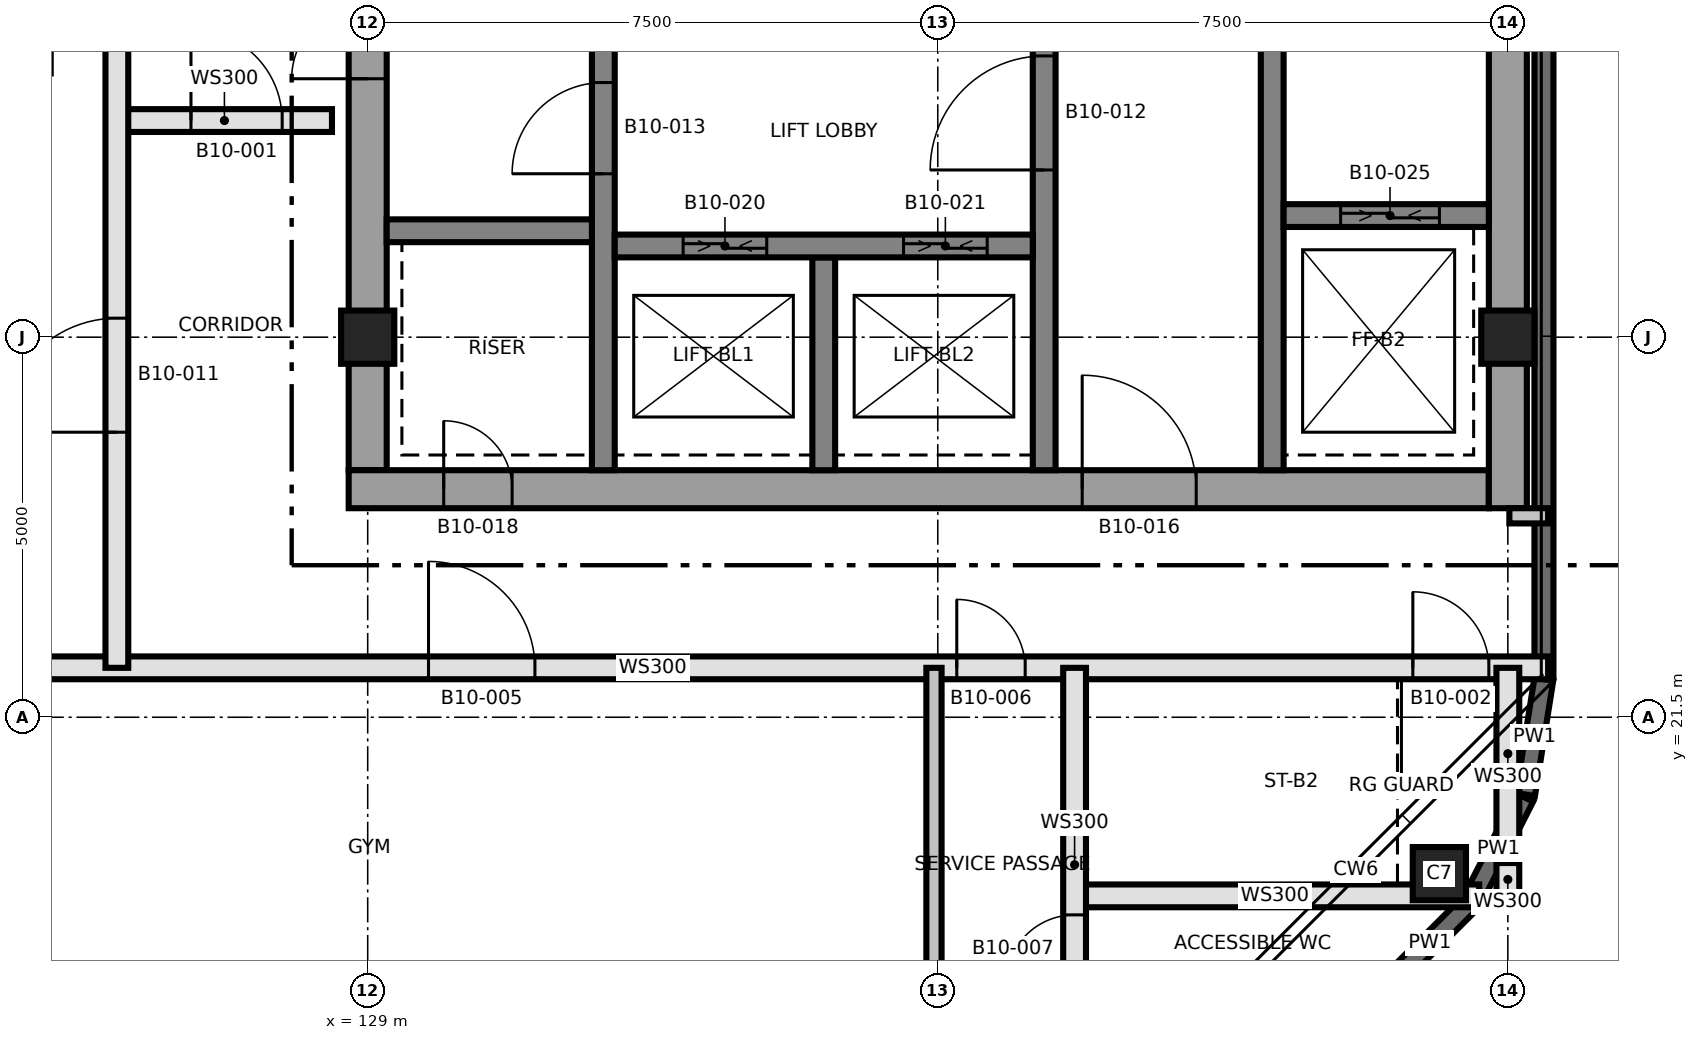
"""IFC4 building model, lengths in metres.
Left out: names, types, materials, properties, quantities, classifications, styles, units other than length and angle.
Written with IfcOpenShell. Run it as: python <this file> out.ifc"""

import sys

from ifc_helpers import new_model, si_unit, direction, frame, frame_2d, origin, origin_2d, place, context, subcontext, project, spatial, rectangle, extrude, element, fill, save


model = new_model("IFC4")
c1 = context("Model", 3, precision=1e-05, world=origin(), true_north=direction((0.0, 1.0)))
c2 = subcontext(c1, "Body", "Model", "MODEL_VIEW")
j1 = project(units=[si_unit("LENGTHUNIT", "METRE"), si_unit("PLANEANGLEUNIT", "RADIAN")], contexts=[c1])
p1 = place(None, origin())
s1 = spatial("IfcSite", under=j1, at=p1, CompositionType="ELEMENT")
p2 = place(p1, origin())
s2 = spatial("IfcBuilding", under=s1, at=p2, CompositionType="ELEMENT")
p3 = place(p2, frame((0.0, 0.0, 101.9)))
s3 = spatial("IfcBuildingStorey", under=s2, at=p3, CompositionType="ELEMENT", Elevation=101.9)
p4 = place(p3, frame((129.0, 24.75, 0.0), z_axis=(0.0, 0.0, 1.0), x_axis=(0.0, 1.0, 0.0)))
e1 = element("IfcWall", 1, at=p4, inside=s3, PredefinedType="SHEAR", context=c2, shape_type="SweptSolid", body=[
    extrude(rectangle(XDim=12.5, YDim=0.5, at=frame_2d((6.25, 0.0))), origin(), (0.0, 0.0, 1.0), 3.7),
])
p5 = place(p4, frame((5.15, 0.0, 0.0)))
e2 = element("IfcOpeningElement", 2, at=p5, cuts=e1, PredefinedType="OPENING", context=c2, shape_type="SweptSolid", body=[
    extrude(rectangle(XDim=1.0, YDim=2.1, at=frame_2d((0.5, 1.05))), frame((0.0, 0.26, 0.0), z_axis=(0.0, -1.0, 0.0), x_axis=(1.0, 0.0, 0.0)), (0.0, 0.0, 1.0), 0.52),
])
p6 = place(p3, frame((128.75, 24.5, 0.0), z_axis=(0.0, 0.0, 1.0), x_axis=(1.0, 0.0, 0.0)))
e3 = element("IfcWall", 3, at=p6, inside=s3, PredefinedType="SHEAR", context=c2, shape_type="SweptSolid", body=[
    extrude(rectangle(XDim=15.0, YDim=0.5, at=frame_2d((7.5, 0.0))), origin(), (0.0, 0.0, 1.0), 3.7),
])
p7 = place(p6, frame((9.65, 0.0, 0.0)))
e4 = element("IfcOpeningElement", 4, at=p7, cuts=e3, PredefinedType="OPENING", context=c2, shape_type="SweptSolid", body=[
    extrude(rectangle(XDim=1.5, YDim=2.1, at=frame_2d((0.75, 1.05))), frame((0.0, 0.26, 0.0), z_axis=(0.0, -1.0, 0.0), x_axis=(1.0, 0.0, 0.0)), (0.0, 0.0, 1.0), 0.52),
])
p8 = place(p6, frame((1.25, 0.0, 0.0)))
e5 = element("IfcOpeningElement", 5, at=p8, cuts=e3, PredefinedType="OPENING", context=c2, shape_type="SweptSolid", body=[
    extrude(rectangle(XDim=0.9, YDim=2.1, at=frame_2d((0.45, 1.05))), frame((0.0, 0.26, 0.0), z_axis=(0.0, -1.0, 0.0), x_axis=(1.0, 0.0, 0.0)), (0.0, 0.0, 1.0), 0.52),
])
p9 = place(p3, frame((144.0, 24.25, 0.0), z_axis=(0.0, 0.0, 1.0), x_axis=(0.0, 1.0, 0.0)))
e6 = element("IfcWall", 6, at=p9, inside=s3, PredefinedType="SHEAR", context=c2, shape_type="SweptSolid", body=[
    extrude(rectangle(XDim=13.5, YDim=0.5, at=frame_2d((6.75, 0.0))), origin(), (0.0, 0.0, 1.0), 3.7),
])
p10 = place(p3, frame((132.1, 24.75, 0.0), z_axis=(0.0, 0.0, 1.0), x_axis=(0.0, 1.0, 0.0)))
e7 = element("IfcWall", 7, at=p10, inside=s3, PredefinedType="SHEAR", context=c2, shape_type="SweptSolid", body=[
    extrude(rectangle(XDim=12.5, YDim=0.3, at=frame_2d((6.25, 0.0))), origin(), (0.0, 0.0, 1.0), 3.7),
])
p11 = place(p10, frame((3.9, 0.0, 0.0)))
e8 = element("IfcOpeningElement", 8, at=p11, cuts=e7, PredefinedType="OPENING", context=c2, shape_type="SweptSolid", body=[
    extrude(rectangle(XDim=1.2, YDim=2.1, at=frame_2d((0.6, 1.05))), frame((0.0, 0.16, 0.0), z_axis=(0.0, -1.0, 0.0), x_axis=(1.0, 0.0, 0.0)), (0.0, 0.0, 1.0), 0.32),
])
p12 = place(p3, frame((137.9, 24.75, 0.0), z_axis=(0.0, 0.0, 1.0), x_axis=(0.0, 1.0, 0.0)))
e9 = element("IfcWall", 9, at=p12, inside=s3, PredefinedType="SHEAR", context=c2, shape_type="SweptSolid", body=[
    extrude(rectangle(XDim=12.5, YDim=0.3, at=frame_2d((6.25, 0.0))), origin(), (0.0, 0.0, 1.0), 3.7),
])
p13 = place(p12, frame((3.95, 0.0, 0.0)))
e10 = element("IfcOpeningElement", 10, at=p13, cuts=e9, PredefinedType="OPENING", context=c2, shape_type="SweptSolid", body=[
    extrude(rectangle(XDim=1.5, YDim=2.1, at=frame_2d((0.75, 1.05))), frame((0.0, 0.16, 0.0), z_axis=(0.0, -1.0, 0.0), x_axis=(1.0, 0.0, 0.0)), (0.0, 0.0, 1.0), 0.32),
])
p14 = place(p12, frame((10.45, 0.0, 0.0)))
e11 = element("IfcOpeningElement", 11, at=p14, cuts=e9, PredefinedType="OPENING", context=c2, shape_type="SweptSolid", body=[
    extrude(rectangle(XDim=0.9, YDim=2.1, at=frame_2d((0.45, 1.05))), frame((0.0, 0.16, 0.0), z_axis=(0.0, -1.0, 0.0), x_axis=(1.0, 0.0, 0.0)), (0.0, 0.0, 1.0), 0.32),
])
p15 = place(p3, frame((140.9, 24.75, 0.0), z_axis=(0.0, 0.0, 1.0), x_axis=(0.0, 1.0, 0.0)))
e12 = element("IfcWall", 12, at=p15, inside=s3, PredefinedType="SHEAR", context=c2, shape_type="SweptSolid", body=[
    extrude(rectangle(XDim=12.5, YDim=0.3, at=frame_2d((6.25, 0.0))), origin(), (0.0, 0.0, 1.0), 3.7),
])
p16 = place(p15, frame((5.9, 0.0, 0.0)))
e13 = element("IfcOpeningElement", 13, at=p16, cuts=e12, PredefinedType="OPENING", context=c2, shape_type="SweptSolid", body=[
    extrude(rectangle(XDim=1.2, YDim=2.1, at=frame_2d((0.6, 1.05))), frame((0.0, 0.16, 0.0), z_axis=(0.0, -1.0, 0.0), x_axis=(1.0, 0.0, 0.0)), (0.0, 0.0, 1.0), 0.32),
])
p17 = place(p3, frame((135.0, 24.75, 0.0), z_axis=(0.0, 0.0, 1.0), x_axis=(0.0, 1.0, 0.0)))
e14 = element("IfcWall", 14, at=p17, inside=s3, PredefinedType="SHEAR", context=c2, shape_type="SweptSolid", body=[
    extrude(rectangle(XDim=2.8, YDim=0.3, at=frame_2d((1.4, 0.0))), origin(), (0.0, 0.0, 1.0), 3.7),
])
p18 = place(p3, frame((132.25, 27.7, 0.0), z_axis=(0.0, 0.0, 1.0), x_axis=(1.0, 0.0, 0.0)))
e15 = element("IfcWall", 15, at=p18, inside=s3, PredefinedType="SHEAR", context=c2, shape_type="SweptSolid", body=[
    extrude(rectangle(XDim=5.5, YDim=0.3, at=frame_2d((2.75, 0.0))), origin(), (0.0, 0.0, 1.0), 3.7),
])
p19 = place(p18, frame((0.9, 0.0, 0.0)))
e16 = element("IfcOpeningElement", 16, at=p19, cuts=e15, PredefinedType="OPENING", context=c2, shape_type="SweptSolid", body=[
    extrude(rectangle(XDim=1.1, YDim=2.4, at=frame_2d((0.55, 1.2))), frame((0.0, 0.16, 0.0), z_axis=(0.0, -1.0, 0.0), x_axis=(1.0, 0.0, 0.0)), (0.0, 0.0, 1.0), 0.32),
])
p20 = place(p18, frame((3.8, 0.0, 0.0)))
e17 = element("IfcOpeningElement", 17, at=p20, cuts=e15, PredefinedType="OPENING", context=c2, shape_type="SweptSolid", body=[
    extrude(rectangle(XDim=1.1, YDim=2.4, at=frame_2d((0.55, 1.2))), frame((0.0, 0.16, 0.0), z_axis=(0.0, -1.0, 0.0), x_axis=(1.0, 0.0, 0.0)), (0.0, 0.0, 1.0), 0.32),
])
p21 = place(p3, frame((129.25, 27.9, 0.0), z_axis=(0.0, 0.0, 1.0), x_axis=(1.0, 0.0, 0.0)))
e18 = element("IfcWall", 18, at=p21, inside=s3, PredefinedType="SHEAR", context=c2, shape_type="SweptSolid", body=[
    extrude(rectangle(XDim=2.7, YDim=0.3, at=frame_2d((1.35, 0.0))), origin(), (0.0, 0.0, 1.0), 3.7),
])
p22 = place(p3, frame((141.05, 28.1, 0.0), z_axis=(0.0, 0.0, 1.0), x_axis=(1.0, 0.0, 0.0)))
e19 = element("IfcWall", 19, at=p22, inside=s3, PredefinedType="SHEAR", context=c2, shape_type="SweptSolid", body=[
    extrude(rectangle(XDim=2.7, YDim=0.3, at=frame_2d((1.35, 0.0))), origin(), (0.0, 0.0, 1.0), 3.7),
])
p23 = place(p22, frame((0.75, 0.0, 0.0)))
e20 = element("IfcOpeningElement", 20, at=p23, cuts=e19, PredefinedType="OPENING", context=c2, shape_type="SweptSolid", body=[
    extrude(rectangle(XDim=1.3, YDim=2.4, at=frame_2d((0.65, 1.2))), frame((0.0, 0.16, 0.0), z_axis=(0.0, -1.0, 0.0), x_axis=(1.0, 0.0, 0.0)), (0.0, 0.0, 1.0), 0.32),
])
for number, where, z_axis, x_axis in (
    (21, (143.099, 19.442, 0.0), (0.0, 0.0, 1.0), (1.0, 0.0, 0.0)),
    (22, (129.0, 26.5, 0.0), (0.0, 0.0, 1.0), (1.0, 0.0, 0.0)),
    (23, (144.0, 26.5, 0.0), (0.0, 0.0, 1.0), (1.0, 0.0, 0.0)),
):
    element("IfcColumn", number, at=place(p3, frame(where, z_axis=z_axis, x_axis=x_axis)), inside=s3, PredefinedType="COLUMN", context=c2, shape_type="SweptSolid", body=[
        extrude(rectangle(XDim=0.7, YDim=0.7, at=origin_2d()), origin(), (0.0, 0.0, 1.0), 3.7),
    ])
p24 = place(p3, frame((142.437, 17.99, 3.7), z_axis=(0.0, 0.0, 1.0), x_axis=(0.707106781187, 0.707106781187, 0.0)))
e24 = element("IfcWall", 24, at=p24, inside=s3, PredefinedType="PARAPET", context=c2, shape_type="SweptSolid", body=[
    extrude(rectangle(XDim=1.516, YDim=0.25, at=frame_2d((0.758, 0.0))), origin(), (0.0, 0.0, 1.0), 1.1),
])
p25 = place(p3, frame((143.532, 19.094, 3.7), z_axis=(0.0, 0.0, 1.0), x_axis=(0.453961953638, 0.891021068577, 0.0)))
e25 = element("IfcWall", 25, at=p25, inside=s3, PredefinedType="PARAPET", context=c2, shape_type="SweptSolid", body=[
    extrude(rectangle(XDim=1.517, YDim=0.25, at=frame_2d((0.758, 0.0))), origin(), (0.0, 0.0, 1.0), 1.1),
])
p26 = place(p3, frame((144.233, 20.483, 3.7), z_axis=(0.0, 0.0, 1.0), x_axis=(0.156378762167, 0.987697161453, 0.0)))
e26 = element("IfcWall", 26, at=p26, inside=s3, PredefinedType="PARAPET", context=c2, shape_type="SweptSolid", body=[
    extrude(rectangle(XDim=1.536, YDim=0.25, at=frame_2d((0.768, 0.0))), origin(), (0.0, 0.0, 1.0), 1.1),
])
p27 = place(p3, frame((144.475, 22.02, 3.7), z_axis=(0.0, 0.0, 1.0), x_axis=(0.0, 1.0, 0.0)))
e27 = element("IfcWall", 27, at=p27, inside=s3, PredefinedType="PARAPET", context=c2, shape_type="SweptSolid", body=[
    extrude(rectangle(XDim=17.96, YDim=0.25, at=frame_2d((8.98, 0.0))), origin(), (0.0, 0.0, 1.0), 1.1),
])
p28 = place(p3, frame((138.25, 19.15, 0.0), z_axis=(0.0, 0.0, 1.0), x_axis=(1.0, 0.0, 0.0)))
e28 = element("IfcWall", 28, at=p28, inside=s3, PredefinedType="SOLIDWALL", context=c2, shape_type="SweptSolid", body=[
    extrude(rectangle(XDim=5.373, YDim=0.3, at=frame_2d((2.687, 0.0))), origin(), (0.0, 0.0, 1.0), 3.3),
])
p29 = place(p3, frame((120.97, 22.15, 0.0), z_axis=(0.0, 0.0, 1.0), x_axis=(1.0, 0.0, 0.0)))
e29 = element("IfcWall", 29, at=p29, inside=s3, PredefinedType="SOLIDWALL", context=c2, shape_type="SweptSolid", body=[
    extrude(rectangle(XDim=23.56, YDim=0.3, at=frame_2d((11.78, 0.0))), origin(), (0.0, 0.0, 1.0), 3.3),
])
p30 = place(p29, frame((21.78, 0.0, 0.0)))
e30 = element("IfcOpeningElement", 30, at=p30, cuts=e29, PredefinedType="OPENING", context=c2, shape_type="SweptSolid", body=[
    extrude(rectangle(XDim=1.0, YDim=2.1, at=frame_2d((0.5, 1.05))), frame((0.0, 0.16, 0.0), z_axis=(0.0, -1.0, 0.0), x_axis=(1.0, 0.0, 0.0)), (0.0, 0.0, 1.0), 0.32),
])
p31 = place(p29, frame((8.83, 0.0, 0.0)))
e31 = element("IfcOpeningElement", 31, at=p31, cuts=e29, PredefinedType="OPENING", context=c2, shape_type="SweptSolid", body=[
    extrude(rectangle(XDim=1.4, YDim=2.1, at=frame_2d((0.7, 1.05))), frame((0.0, 0.16, 0.0), z_axis=(0.0, -1.0, 0.0), x_axis=(1.0, 0.0, 0.0)), (0.0, 0.0, 1.0), 0.32),
])
p32 = place(p29, frame((15.78, 0.0, 0.0)))
e32 = element("IfcOpeningElement", 32, at=p32, cuts=e29, PredefinedType="OPENING", context=c2, shape_type="SweptSolid", body=[
    extrude(rectangle(XDim=0.9, YDim=2.1, at=frame_2d((0.45, 1.05))), frame((0.0, 0.16, 0.0), z_axis=(0.0, -1.0, 0.0), x_axis=(1.0, 0.0, 0.0)), (0.0, 0.0, 1.0), 0.32),
])
p33 = place(p3, frame((144.02, 24.15, 0.0), z_axis=(0.0, 0.0, 1.0), x_axis=(1.0, 0.0, 0.0)))
e33 = element("IfcWall", 33, at=p33, inside=s3, PredefinedType="PARTITIONING", context=c2, shape_type="SweptSolid", body=[
    extrude(rectangle(XDim=0.51, YDim=0.2, at=frame_2d((0.255, 0.0))), origin(), (0.0, 0.0, 1.0), 3.3),
])
p34 = place(p3, frame((125.7, 29.35, 0.0), z_axis=(0.0, 0.0, 1.0), x_axis=(1.0, 0.0, 0.0)))
e34 = element("IfcWall", 34, at=p34, inside=s3, PredefinedType="SOLIDWALL", context=c2, shape_type="SweptSolid", body=[
    extrude(rectangle(XDim=2.83, YDim=0.3, at=frame_2d((1.415, 0.0))), origin(), (0.0, 0.0, 1.0), 3.3),
])
p35 = place(p34, frame((0.975, 0.0, 0.0)))
e35 = element("IfcOpeningElement", 35, at=p35, cuts=e34, PredefinedType="OPENING", context=c2, shape_type="SweptSolid", body=[
    extrude(rectangle(XDim=1.2, YDim=2.1, at=frame_2d((0.6, 1.05))), frame((0.0, 0.16, 0.0), z_axis=(0.0, -1.0, 0.0), x_axis=(1.0, 0.0, 0.0)), (0.0, 0.0, 1.0), 0.32),
])
p36 = place(p3, frame((125.7, 22.15, 0.0), z_axis=(0.0, 0.0, 1.0), x_axis=(0.0, 1.0, 0.0)))
e36 = element("IfcWall", 36, at=p36, inside=s3, PredefinedType="SOLIDWALL", context=c2, shape_type="SweptSolid", body=[
    extrude(rectangle(XDim=17.7, YDim=0.3, at=frame_2d((8.85, 0.0))), origin(), (0.0, 0.0, 1.0), 3.3),
])
p37 = place(p36, frame((3.1, 0.0, 0.0)))
e37 = element("IfcOpeningElement", 37, at=p37, cuts=e36, PredefinedType="OPENING", context=c2, shape_type="SweptSolid", body=[
    extrude(rectangle(XDim=1.5, YDim=2.1, at=frame_2d((0.75, 1.05))), frame((0.0, 0.16, 0.0), z_axis=(0.0, -1.0, 0.0), x_axis=(1.0, 0.0, 0.0)), (0.0, 0.0, 1.0), 0.32),
])
p38 = place(p3, frame((136.45, 16.97, 0.0), z_axis=(0.0, 0.0, 1.0), x_axis=(0.0, 1.0, 0.0)))
e38 = element("IfcWall", 38, at=p38, inside=s3, PredefinedType="PARTITIONING", context=c2, shape_type="SweptSolid", body=[
    extrude(rectangle(XDim=5.18, YDim=0.2, at=frame_2d((2.59, 0.0))), origin(), (0.0, 0.0, 1.0), 3.3),
])
p39 = place(p3, frame((138.3, 16.97, 0.0), z_axis=(0.0, 0.0, 1.0), x_axis=(0.0, 1.0, 0.0)))
e39 = element("IfcWall", 39, at=p39, inside=s3, PredefinedType="SOLIDWALL", context=c2, shape_type="SweptSolid", body=[
    extrude(rectangle(XDim=5.18, YDim=0.3, at=frame_2d((2.59, 0.0))), origin(), (0.0, 0.0, 1.0), 3.3),
])
p40 = place(p39, frame((1.03, 0.0, 0.0)))
e40 = element("IfcOpeningElement", 40, at=p40, cuts=e39, PredefinedType="OPENING", context=c2, shape_type="SweptSolid", body=[
    extrude(rectangle(XDim=0.9, YDim=2.1, at=frame_2d((0.45, 1.05))), frame((0.0, 0.16, 0.0), z_axis=(0.0, -1.0, 0.0), x_axis=(1.0, 0.0, 0.0)), (0.0, 0.0, 1.0), 0.32),
])
p41 = place(p3, frame((144.0, 19.15, 0.0), z_axis=(0.0, 0.0, 1.0), x_axis=(0.0, 1.0, 0.0)))
e41 = element("IfcWall", 41, at=p41, inside=s3, PredefinedType="SOLIDWALL", context=c2, shape_type="SweptSolid", body=[
    extrude(rectangle(XDim=0.432, YDim=0.3, at=frame_2d((0.216, 0.0))), origin(), (0.0, 0.0, 1.0), 3.3),
])
p42 = place(p3, frame((144.0, 19.891, 0.0), z_axis=(0.0, 0.0, 1.0), x_axis=(0.0, 1.0, 0.0)))
e42 = element("IfcWall", 42, at=p42, inside=s3, PredefinedType="SOLIDWALL", context=c2, shape_type="SweptSolid", body=[
    extrude(rectangle(XDim=2.259, YDim=0.3, at=frame_2d((1.129, 0.0))), origin(), (0.0, 0.0, 1.0), 3.3),
])
p43 = place(p35, origin())
e43 = element("IfcDoor", 43, at=p43, inside=s3, OperationType="SINGLE_SWING_LEFT", PredefinedType="DOOR", context=c2, shape_type="SweptSolid", body=[
    extrude(rectangle(XDim=1.2, YDim=2.1, at=frame_2d((0.6, 1.05))), frame((0.0, 0.025, 0.0), z_axis=(0.0, -1.0, 0.0), x_axis=(1.0, 0.0, 0.0)), (0.0, 0.0, 1.0), 0.05),
])
fill(e35, e43)
p44 = place(p30, origin())
e44 = element("IfcDoor", 44, at=p44, inside=s3, OperationType="SINGLE_SWING_RIGHT", PredefinedType="DOOR", context=c2, shape_type="SweptSolid", body=[
    extrude(rectangle(XDim=1.0, YDim=2.1, at=frame_2d((0.5, 1.05))), frame((0.0, 0.025, 0.0), z_axis=(0.0, -1.0, 0.0), x_axis=(1.0, 0.0, 0.0)), (0.0, 0.0, 1.0), 0.05),
])
fill(e30, e44)
p45 = place(p31, origin())
e45 = element("IfcDoor", 45, at=p45, inside=s3, OperationType="SINGLE_SWING_LEFT", PredefinedType="DOOR", context=c2, shape_type="SweptSolid", body=[
    extrude(rectangle(XDim=1.4, YDim=2.1, at=frame_2d((0.7, 1.05))), frame((0.0, 0.025, 0.0), z_axis=(0.0, -1.0, 0.0), x_axis=(1.0, 0.0, 0.0)), (0.0, 0.0, 1.0), 0.05),
])
fill(e31, e45)
p46 = place(p32, origin())
e46 = element("IfcDoor", 46, at=p46, inside=s3, OperationType="SINGLE_SWING_RIGHT", PredefinedType="DOOR", context=c2, shape_type="SweptSolid", body=[
    extrude(rectangle(XDim=0.9, YDim=2.1, at=frame_2d((0.45, 1.05))), frame((0.0, 0.025, 0.0), z_axis=(0.0, -1.0, 0.0), x_axis=(1.0, 0.0, 0.0)), (0.0, 0.0, 1.0), 0.05),
])
fill(e32, e46)
p47 = place(p40, origin())
e47 = element("IfcDoor", 47, at=p47, inside=s3, OperationType="SINGLE_SWING_RIGHT", PredefinedType="DOOR", context=c2, shape_type="SweptSolid", body=[
    extrude(rectangle(XDim=0.9, YDim=2.1, at=frame_2d((0.45, 1.05))), frame((0.0, 0.025, 0.0), z_axis=(0.0, -1.0, 0.0), x_axis=(1.0, 0.0, 0.0)), (0.0, 0.0, 1.0), 0.05),
])
fill(e40, e47)
p48 = place(p37, origin())
e48 = element("IfcDoor", 48, at=p48, inside=s3, OperationType="SINGLE_SWING_RIGHT", PredefinedType="DOOR", context=c2, shape_type="SweptSolid", body=[
    extrude(rectangle(XDim=1.5, YDim=2.1, at=frame_2d((0.75, 1.05))), frame((0.0, 0.025, 0.0), z_axis=(0.0, -1.0, 0.0), x_axis=(1.0, 0.0, 0.0)), (0.0, 0.0, 1.0), 0.05),
])
fill(e37, e48)
p49 = place(p13, origin())
e49 = element("IfcDoor", 49, at=p49, inside=s3, OperationType="SINGLE_SWING_RIGHT", PredefinedType="DOOR", context=c2, shape_type="SweptSolid", body=[
    extrude(rectangle(XDim=1.5, YDim=2.1, at=frame_2d((0.75, 1.05))), frame((0.0, 0.025, 0.0), z_axis=(0.0, -1.0, 0.0), x_axis=(1.0, 0.0, 0.0)), (0.0, 0.0, 1.0), 0.05),
])
fill(e10, e49)
p50 = place(p11, origin())
e50 = element("IfcDoor", 50, at=p50, inside=s3, OperationType="SINGLE_SWING_LEFT", PredefinedType="DOOR", context=c2, shape_type="SweptSolid", body=[
    extrude(rectangle(XDim=1.2, YDim=2.1, at=frame_2d((0.6, 1.05))), frame((0.0, 0.025, 0.0), z_axis=(0.0, -1.0, 0.0), x_axis=(1.0, 0.0, 0.0)), (0.0, 0.0, 1.0), 0.05),
])
fill(e8, e50)
p51 = place(p5, origin())
e51 = element("IfcDoor", 51, at=p51, inside=s3, OperationType="SINGLE_SWING_RIGHT", PredefinedType="DOOR", context=c2, shape_type="SweptSolid", body=[
    extrude(rectangle(XDim=1.0, YDim=2.1, at=frame_2d((0.5, 1.05))), frame((0.0, 0.025, 0.0), z_axis=(0.0, -1.0, 0.0), x_axis=(1.0, 0.0, 0.0)), (0.0, 0.0, 1.0), 0.05),
])
fill(e2, e51)
p52 = place(p7, origin())
e52 = element("IfcDoor", 52, at=p52, inside=s3, OperationType="SINGLE_SWING_LEFT", PredefinedType="DOOR", context=c2, shape_type="SweptSolid", body=[
    extrude(rectangle(XDim=1.5, YDim=2.1, at=frame_2d((0.75, 1.05))), frame((0.0, 0.025, 0.0), z_axis=(0.0, -1.0, 0.0), x_axis=(1.0, 0.0, 0.0)), (0.0, 0.0, 1.0), 0.05),
])
fill(e4, e52)
p53 = place(p8, origin())
e53 = element("IfcDoor", 53, at=p53, inside=s3, OperationType="SINGLE_SWING_LEFT", PredefinedType="DOOR", context=c2, shape_type="SweptSolid", body=[
    extrude(rectangle(XDim=0.9, YDim=2.1, at=frame_2d((0.45, 1.05))), frame((0.0, 0.025, 0.0), z_axis=(0.0, -1.0, 0.0), x_axis=(1.0, 0.0, 0.0)), (0.0, 0.0, 1.0), 0.05),
])
fill(e5, e53)
p54 = place(p19, origin())
e54 = element("IfcDoor", 54, at=p54, inside=s3, OperationType="SLIDING_TO_LEFT", PredefinedType="DOOR", context=c2, shape_type="SweptSolid", body=[
    extrude(rectangle(XDim=1.1, YDim=2.4, at=frame_2d((0.55, 1.2))), frame((0.0, 0.025, 0.0), z_axis=(0.0, -1.0, 0.0), x_axis=(1.0, 0.0, 0.0)), (0.0, 0.0, 1.0), 0.05),
])
fill(e16, e54)
p55 = place(p20, origin())
e55 = element("IfcDoor", 55, at=p55, inside=s3, OperationType="SLIDING_TO_LEFT", PredefinedType="DOOR", context=c2, shape_type="SweptSolid", body=[
    extrude(rectangle(XDim=1.1, YDim=2.4, at=frame_2d((0.55, 1.2))), frame((0.0, 0.025, 0.0), z_axis=(0.0, -1.0, 0.0), x_axis=(1.0, 0.0, 0.0)), (0.0, 0.0, 1.0), 0.05),
])
fill(e17, e55)
p56 = place(p23, origin())
e56 = element("IfcDoor", 56, at=p56, inside=s3, OperationType="SLIDING_TO_LEFT", PredefinedType="DOOR", context=c2, shape_type="SweptSolid", body=[
    extrude(rectangle(XDim=1.3, YDim=2.4, at=frame_2d((0.65, 1.2))), frame((0.0, 0.025, 0.0), z_axis=(0.0, -1.0, 0.0), x_axis=(1.0, 0.0, 0.0)), (0.0, 0.0, 1.0), 0.05),
])
fill(e20, e56)
save(model, sys.argv[1])
